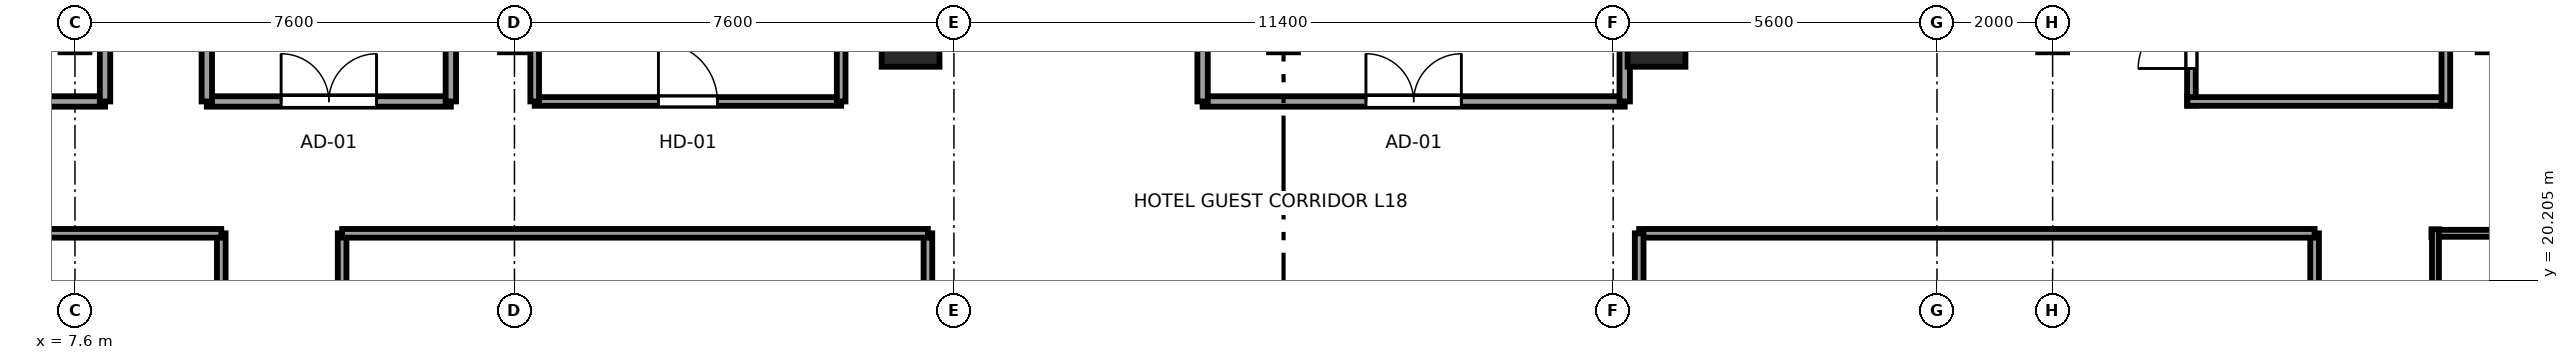
"""IFC4 building model, lengths in metres.
Left out: names, types, materials, properties, quantities, classifications, styles, units other than length and angle.
Written with IfcOpenShell. Run it as: python <this file> out.ifc"""

import sys

from ifc_helpers import new_model, si_unit, direction, frame, frame_2d, origin, origin_2d, place, context, subcontext, project, spatial, rectangle, extrude, source, transform, mapped, element, fill, save


model = new_model("IFC4")
c1 = context("Model", 3, precision=1e-05, world=origin(), true_north=direction((0.0, 1.0)))
c2 = subcontext(c1, "Body", "Model", "MODEL_VIEW")
j1 = project(units=[si_unit("LENGTHUNIT", "METRE"), si_unit("PLANEANGLEUNIT", "RADIAN")], contexts=[c1])
p1 = place(None, origin())
s1 = spatial("IfcSite", under=j1, at=p1, CompositionType="ELEMENT")
p2 = place(p1, origin())
s2 = spatial("IfcBuilding", under=s1, at=p2, CompositionType="ELEMENT")
p3 = place(p2, frame((0.0, 0.0, 74.6)))
s3 = spatial("IfcBuildingStorey", under=s2, at=p3, CompositionType="ELEMENT", Elevation=74.6)
m1 = source(origin(), c2, "Body", "SweptSolid", [
    extrude(rectangle(XDim=1.0, YDim=1.0, at=origin_2d()), origin(), (0.0, 0.0, 1.0), 3.55),
])
for number, where, z_axis, x_axis in (
    (1, (22.05, 24.4, 0.0), (0.0, 0.0, 1.0), (1.0, 0.0, 0.0)),
    (2, (34.95, 24.4, 0.0), (0.0, 0.0, 1.0), (1.0, 0.0, 0.0)),
):
    element("IfcColumn", number, at=place(p3, frame(where, z_axis=z_axis, x_axis=x_axis)), inside=s3, PredefinedType="COLUMN", context=c2, shape_type="MappedRepresentation", body=[
        mapped(m1, transform((0.0, 0.0, 0.0), x_axis=(1.0, 0.0, 0.0), y_axis=(0.0, 1.0, 0.0), z_axis=(0.0, 0.0, 1.0), scale=1.0)),
    ])
p4 = place(p3, frame((48.35, 21.02, 0.0), z_axis=(0.0, 0.0, 1.0), x_axis=(1.0, 0.0, 0.0)))
e3 = element("IfcWall", 3, at=p4, inside=s3, PredefinedType="PLUMBINGWALL", context=c2, shape_type="SweptSolid", body=[
    extrude(rectangle(XDim=2.59, YDim=0.12, at=frame_2d((1.295, 0.0))), origin(), (0.0, 0.0, 1.0), 3.37),
])
p5 = place(p3, frame((48.42, 18.7, 0.0), z_axis=(0.0, 0.0, 1.0), x_axis=(0.0, 1.0, 0.0)))
e4 = element("IfcWall", 4, at=p5, inside=s3, PredefinedType="PLUMBINGWALL", context=c2, shape_type="SweptSolid", body=[
    extrude(rectangle(XDim=2.39, YDim=0.12, at=frame_2d((1.195, 0.0))), origin(), (0.0, 0.0, 1.0), 3.37),
])
p6 = place(p3, frame((10.13, 18.21, 0.0), z_axis=(0.0, 0.0, 1.0), x_axis=(0.0, 1.0, 0.0)))
e5 = element("IfcWall", 5, at=p6, inside=s3, PredefinedType="PARTITIONING", context=c2, shape_type="SweptSolid", body=[
    extrude(rectangle(XDim=2.81, YDim=0.15, at=frame_2d((1.405, 0.0))), origin(), (0.0, 0.0, 1.0), 3.37),
])
p7 = place(p6, frame((0.895, 0.0, 0.0)))
e6 = element("IfcOpeningElement", 6, at=p7, cuts=e5, PredefinedType="OPENING", context=c2, shape_type="SweptSolid", body=[
    extrude(rectangle(XDim=0.98, YDim=2.12, at=frame_2d((0.49, 1.06))), frame((0.0, 0.085, 0.0), z_axis=(0.0, -1.0, 0.0), x_axis=(1.0, 0.0, 0.0)), (0.0, 0.0, 1.0), 0.17),
])
p8 = place(p3, frame((0.405, 21.02, 0.0), z_axis=(0.0, 0.0, 1.0), x_axis=(1.0, 0.0, 0.0)))
e7 = element("IfcWall", 7, at=p8, inside=s3, PredefinedType="PARTITIONING", context=c2, shape_type="SweptSolid", body=[
    extrude(rectangle(XDim=9.725, YDim=0.15, at=frame_2d((4.862, 0.0))), origin(), (0.0, 0.0, 1.0), 3.37),
])
p9 = place(p3, frame((12.22, 17.01, 0.0), z_axis=(0.0, 0.0, 1.0), x_axis=(0.0, 1.0, 0.0)))
e8 = element("IfcWall", 8, at=p9, inside=s3, PredefinedType="PARTITIONING", context=c2, shape_type="SweptSolid", body=[
    extrude(rectangle(XDim=4.01, YDim=0.15, at=frame_2d((2.005, 0.0))), origin(), (0.0, 0.0, 1.0), 3.37),
])
p10 = place(p9, frame((1.495, 0.0, 0.0)))
e9 = element("IfcOpeningElement", 9, at=p10, cuts=e8, PredefinedType="OPENING", context=c2, shape_type="SweptSolid", body=[
    extrude(rectangle(XDim=0.98, YDim=2.12, at=frame_2d((0.49, 1.06))), frame((0.0, 0.085, 0.0), z_axis=(0.0, -1.0, 0.0), x_axis=(1.0, 0.0, 0.0)), (0.0, 0.0, 1.0), 0.17),
])
p11 = place(p3, frame((22.35, 14.68, 0.0), z_axis=(0.0, 0.0, 1.0), x_axis=(0.0, 1.0, 0.0)))
e10 = element("IfcWall", 10, at=p11, inside=s3, PredefinedType="PARTITIONING", context=c2, shape_type="SweptSolid", body=[
    extrude(rectangle(XDim=6.34, YDim=0.15, at=frame_2d((3.17, 0.0))), origin(), (0.0, 0.0, 1.0), 3.37),
])
p12 = place(p3, frame((12.22, 21.02, 0.0), z_axis=(0.0, 0.0, 1.0), x_axis=(1.0, 0.0, 0.0)))
e11 = element("IfcWall", 11, at=p12, inside=s3, PredefinedType="PARTITIONING", context=c2, shape_type="SweptSolid", body=[
    extrude(rectangle(XDim=10.13, YDim=0.15, at=frame_2d((5.065, 0.0))), origin(), (0.0, 0.0, 1.0), 3.37),
])
p13 = place(p3, frame((46.33, 17.41, 0.0), z_axis=(0.0, 0.0, 1.0), x_axis=(0.0, 1.0, 0.0)))
e12 = element("IfcWall", 12, at=p13, inside=s3, PredefinedType="PARTITIONING", context=c2, shape_type="SweptSolid", body=[
    extrude(rectangle(XDim=3.61, YDim=0.15, at=frame_2d((1.805, 0.0))), origin(), (0.0, 0.0, 1.0), 3.37),
])
p14 = place(p13, frame((1.295, 0.0, 0.0)))
e13 = element("IfcOpeningElement", 13, at=p14, cuts=e12, PredefinedType="OPENING", context=c2, shape_type="SweptSolid", body=[
    extrude(rectangle(XDim=0.98, YDim=2.12, at=frame_2d((0.49, 1.06))), frame((0.0, 0.085, 0.0), z_axis=(0.0, -1.0, 0.0), x_axis=(1.0, 0.0, 0.0)), (0.0, 0.0, 1.0), 0.17),
])
p15 = place(p3, frame((34.65, 21.02, 0.0), z_axis=(0.0, 0.0, 1.0), x_axis=(1.0, 0.0, 0.0)))
e14 = element("IfcWall", 14, at=p15, inside=s3, PredefinedType="PARTITIONING", context=c2, shape_type="SweptSolid", body=[
    extrude(rectangle(XDim=11.68, YDim=0.15, at=frame_2d((5.84, 0.0))), origin(), (0.0, 0.0, 1.0), 3.37),
])
p16 = place(p3, frame((34.65, 15.08, 0.0), z_axis=(0.0, 0.0, 1.0), x_axis=(0.0, 1.0, 0.0)))
e15 = element("IfcWall", 15, at=p16, inside=s3, PredefinedType="PARTITIONING", context=c2, shape_type="SweptSolid", body=[
    extrude(rectangle(XDim=5.94, YDim=0.15, at=frame_2d((2.97, 0.0))), origin(), (0.0, 0.0, 1.0), 3.37),
])
p17 = place(p3, frame((0.405, 23.3, 0.0), z_axis=(0.0, 0.0, 1.0), x_axis=(1.0, 0.0, 0.0)))
e16 = element("IfcWall", 16, at=p17, inside=s3, PredefinedType="PARTITIONING", context=c2, shape_type="SweptSolid", body=[
    extrude(rectangle(XDim=7.715, YDim=0.18, at=frame_2d((3.857, 0.0))), origin(), (0.0, 0.0, 1.0), 3.37),
])
p18 = place(p17, frame((3.032, 0.0, 0.0)))
e17 = element("IfcOpeningElement", 17, at=p18, cuts=e16, PredefinedType="OPENING", context=c2, shape_type="SweptSolid", body=[
    extrude(rectangle(XDim=1.65, YDim=2.15, at=frame_2d((0.825, 1.075))), frame((0.0, 0.1, 0.0), z_axis=(0.0, -1.0, 0.0), x_axis=(1.0, 0.0, 0.0)), (0.0, 0.0, 1.0), 0.2),
])
p19 = place(p3, frame((8.12, 23.3, 0.0), z_axis=(0.0, 0.0, 1.0), x_axis=(0.0, 1.0, 0.0)))
e18 = element("IfcWall", 18, at=p19, inside=s3, PredefinedType="PARTITIONING", context=c2, shape_type="SweptSolid", body=[
    extrude(rectangle(XDim=3.6, YDim=0.18, at=frame_2d((1.8, 0.0))), origin(), (0.0, 0.0, 1.0), 3.37),
])
p20 = place(p3, frame((44.2, 23.23, 0.0), z_axis=(0.0, 0.0, 1.0), x_axis=(0.0, 1.0, 0.0)))
e19 = element("IfcWall", 19, at=p20, inside=s3, PredefinedType="PARTITIONING", context=c2, shape_type="SweptSolid", body=[
    extrude(rectangle(XDim=2.54, YDim=0.15, at=frame_2d((1.27, 0.0))), origin(), (0.0, 0.0, 1.0), 3.37),
])
p21 = place(p20, frame((0.64, 0.0, 0.0)))
e20 = element("IfcOpeningElement", 20, at=p21, cuts=e19, PredefinedType="OPENING", context=c2, shape_type="SweptSolid", body=[
    extrude(rectangle(XDim=0.92, YDim=2.01, at=frame_2d((0.46, 1.005))), frame((0.0, 0.085, 0.0), z_axis=(0.0, -1.0, 0.0), x_axis=(1.0, 0.0, 0.0)), (0.0, 0.0, 1.0), 0.17),
])
p22 = place(p3, frame((44.13, 23.3, 0.0), z_axis=(0.0, 0.0, 1.0), x_axis=(1.0, 0.0, 0.0)))
e21 = element("IfcWall", 21, at=p22, inside=s3, PredefinedType="PARTITIONING", context=c2, shape_type="SweptSolid", body=[
    extrude(rectangle(XDim=4.54, YDim=0.15, at=frame_2d((2.27, 0.0))), origin(), (0.0, 0.0, 1.0), 3.37),
])
p23 = place(p3, frame((48.6, 23.23, 0.0), z_axis=(0.0, 0.0, 1.0), x_axis=(0.0, 1.0, 0.0)))
e22 = element("IfcWall", 22, at=p23, inside=s3, PredefinedType="PARTITIONING", context=c2, shape_type="SweptSolid", body=[
    extrude(rectangle(XDim=2.54, YDim=0.15, at=frame_2d((1.27, 0.0))), origin(), (0.0, 0.0, 1.0), 3.37),
])
p24 = place(p3, frame((9.88, 23.3, 0.0), z_axis=(0.0, 0.0, 1.0), x_axis=(1.0, 0.0, 0.0)))
e23 = element("IfcWall", 23, at=p24, inside=s3, PredefinedType="PARTITIONING", context=c2, shape_type="SweptSolid", body=[
    extrude(rectangle(XDim=4.22, YDim=0.18, at=frame_2d((2.11, 0.0))), origin(), (0.0, 0.0, 1.0), 3.37),
])
p25 = place(p24, frame((1.285, 0.0, 0.0)))
e24 = element("IfcOpeningElement", 24, at=p25, cuts=e23, PredefinedType="OPENING", context=c2, shape_type="SweptSolid", body=[
    extrude(rectangle(XDim=1.65, YDim=2.15, at=frame_2d((0.825, 1.075))), frame((0.0, 0.1, 0.0), z_axis=(0.0, -1.0, 0.0), x_axis=(1.0, 0.0, 0.0)), (0.0, 0.0, 1.0), 0.2),
])
for number, where, z_axis, x_axis in (
    (25, (9.88, 23.3, 0.0), (0.0, 0.0, 1.0), (0.0, 1.0, 0.0)),
    (26, (14.1, 23.3, 0.0), (0.0, 0.0, 1.0), (0.0, 1.0, 0.0)),
):
    element("IfcWall", number, at=place(p3, frame(where, z_axis=z_axis, x_axis=x_axis)), inside=s3, PredefinedType="PARTITIONING", context=c2, shape_type="SweptSolid", body=[
        extrude(rectangle(XDim=6.45, YDim=0.18, at=frame_2d((3.225, 0.0))), origin(), (0.0, 0.0, 1.0), 3.37),
    ])
p26 = place(p3, frame((27.1, 23.3, 0.0), z_axis=(0.0, 0.0, 1.0), x_axis=(1.0, 0.0, 0.0)))
e27 = element("IfcWall", 27, at=p26, inside=s3, PredefinedType="PARTITIONING", context=c2, shape_type="SweptSolid", body=[
    extrude(rectangle(XDim=7.3, YDim=0.18, at=frame_2d((3.65, 0.0))), origin(), (0.0, 0.0, 1.0), 3.37),
])
p27 = place(p26, frame((2.825, 0.0, 0.0)))
e28 = element("IfcOpeningElement", 28, at=p27, cuts=e27, PredefinedType="OPENING", context=c2, shape_type="SweptSolid", body=[
    extrude(rectangle(XDim=1.65, YDim=2.15, at=frame_2d((0.825, 1.075))), frame((0.0, 0.1, 0.0), z_axis=(0.0, -1.0, 0.0), x_axis=(1.0, 0.0, 0.0)), (0.0, 0.0, 1.0), 0.2),
])
for number, where, z_axis, x_axis in (
    (29, (27.1, 23.3, 0.0), (0.0, 0.0, 1.0), (0.0, 1.0, 0.0)),
    (30, (34.4, 23.3, 0.0), (0.0, 0.0, 1.0), (0.0, 1.0, 0.0)),
):
    element("IfcWall", number, at=place(p3, frame(where, z_axis=z_axis, x_axis=x_axis)), inside=s3, PredefinedType="PARTITIONING", context=c2, shape_type="SweptSolid", body=[
        extrude(rectangle(XDim=6.5, YDim=0.18, at=frame_2d((3.25, 0.0))), origin(), (0.0, 0.0, 1.0), 3.37),
    ])
p28 = place(p3, frame((15.55, 23.3, 0.0), z_axis=(0.0, 0.0, 1.0), x_axis=(1.0, 0.0, 0.0)))
e31 = element("IfcWall", 31, at=p28, inside=s3, PredefinedType="PARTITIONING", context=c2, shape_type="SweptSolid", body=[
    extrude(rectangle(XDim=5.3, YDim=0.15, at=frame_2d((2.65, 0.0))), origin(), (0.0, 0.0, 1.0), 3.37),
])
p29 = place(p28, frame((2.14, 0.0, 0.0)))
e32 = element("IfcOpeningElement", 32, at=p29, cuts=e31, PredefinedType="OPENING", context=c2, shape_type="SweptSolid", body=[
    extrude(rectangle(XDim=1.02, YDim=2.03, at=frame_2d((0.51, 1.015))), frame((0.0, 0.085, 0.0), z_axis=(0.0, -1.0, 0.0), x_axis=(1.0, 0.0, 0.0)), (0.0, 0.0, 1.0), 0.17),
])
for number, where, z_axis, x_axis in (
    (33, (15.55, 23.3, 0.0), (0.0, 0.0, 1.0), (0.0, 1.0, 0.0)),
    (34, (20.85, 23.3, 0.0), (0.0, 0.0, 1.0), (0.0, 1.0, 0.0)),
):
    element("IfcWall", number, at=place(p3, frame(where, z_axis=z_axis, x_axis=x_axis)), inside=s3, PredefinedType="PARTITIONING", context=c2, shape_type="SweptSolid", body=[
        extrude(rectangle(XDim=6.5, YDim=0.15, at=frame_2d((3.25, 0.0))), origin(), (0.0, 0.0, 1.0), 3.37),
    ])
m2 = source(origin(), c2, "Body", "SweptSolid", [
    extrude(rectangle(XDim=0.92, YDim=2.01, at=frame_2d((0.46, 1.005))), frame((0.0, 0.025, 0.0), z_axis=(0.0, -1.0, 0.0), x_axis=(1.0, 0.0, 0.0)), (0.0, 0.0, 1.0), 0.05),
])
p30 = place(p21, origin())
e35 = element("IfcDoor", 35, at=p30, inside=s3, OperationType="SINGLE_SWING_LEFT", PredefinedType="DOOR", context=c2, shape_type="MappedRepresentation", body=[
    mapped(m2, transform((0.0, 0.0, 0.0), x_axis=(1.0, 0.0, 0.0), y_axis=(0.0, 1.0, 0.0), z_axis=(0.0, 0.0, 1.0), scale=1.0)),
])
fill(e20, e35)
m3 = source(origin(), c2, "Body", "SweptSolid", [
    extrude(rectangle(XDim=1.65, YDim=2.15, at=frame_2d((0.825, 1.075))), frame((0.0, 0.025, 0.0), z_axis=(0.0, -1.0, 0.0), x_axis=(1.0, 0.0, 0.0)), (0.0, 0.0, 1.0), 0.05),
])
p31 = place(p25, origin())
e36 = element("IfcDoor", 36, at=p31, inside=s3, OperationType="DOUBLE_DOOR_SINGLE_SWING", PredefinedType="DOOR", context=c2, shape_type="MappedRepresentation", body=[
    mapped(m3, transform((0.0, 0.0, 0.0), x_axis=(1.0, 0.0, 0.0), y_axis=(0.0, 1.0, 0.0), z_axis=(0.0, 0.0, 1.0), scale=1.0)),
])
fill(e24, e36)
p32 = place(p27, origin())
e37 = element("IfcDoor", 37, at=p32, inside=s3, OperationType="DOUBLE_DOOR_SINGLE_SWING", PredefinedType="DOOR", context=c2, shape_type="MappedRepresentation", body=[
    mapped(m3, transform((0.0, 0.0, 0.0), x_axis=(1.0, 0.0, 0.0), y_axis=(0.0, 1.0, 0.0), z_axis=(0.0, 0.0, 1.0), scale=1.0)),
])
fill(e28, e37)
m4 = source(origin(), c2, "Body", "SweptSolid", [
    extrude(rectangle(XDim=1.02, YDim=2.03, at=frame_2d((0.51, 1.015))), frame((0.0, 0.025, 0.0), z_axis=(0.0, -1.0, 0.0), x_axis=(1.0, 0.0, 0.0)), (0.0, 0.0, 1.0), 0.05),
])
p33 = place(p29, origin())
e38 = element("IfcDoor", 38, at=p33, inside=s3, OperationType="SINGLE_SWING_LEFT", PredefinedType="DOOR", context=c2, shape_type="MappedRepresentation", body=[
    mapped(m4, transform((0.0, 0.0, 0.0), x_axis=(1.0, 0.0, 0.0), y_axis=(0.0, 1.0, 0.0), z_axis=(0.0, 0.0, 1.0), scale=1.0)),
])
fill(e32, e38)
save(model, sys.argv[1])
